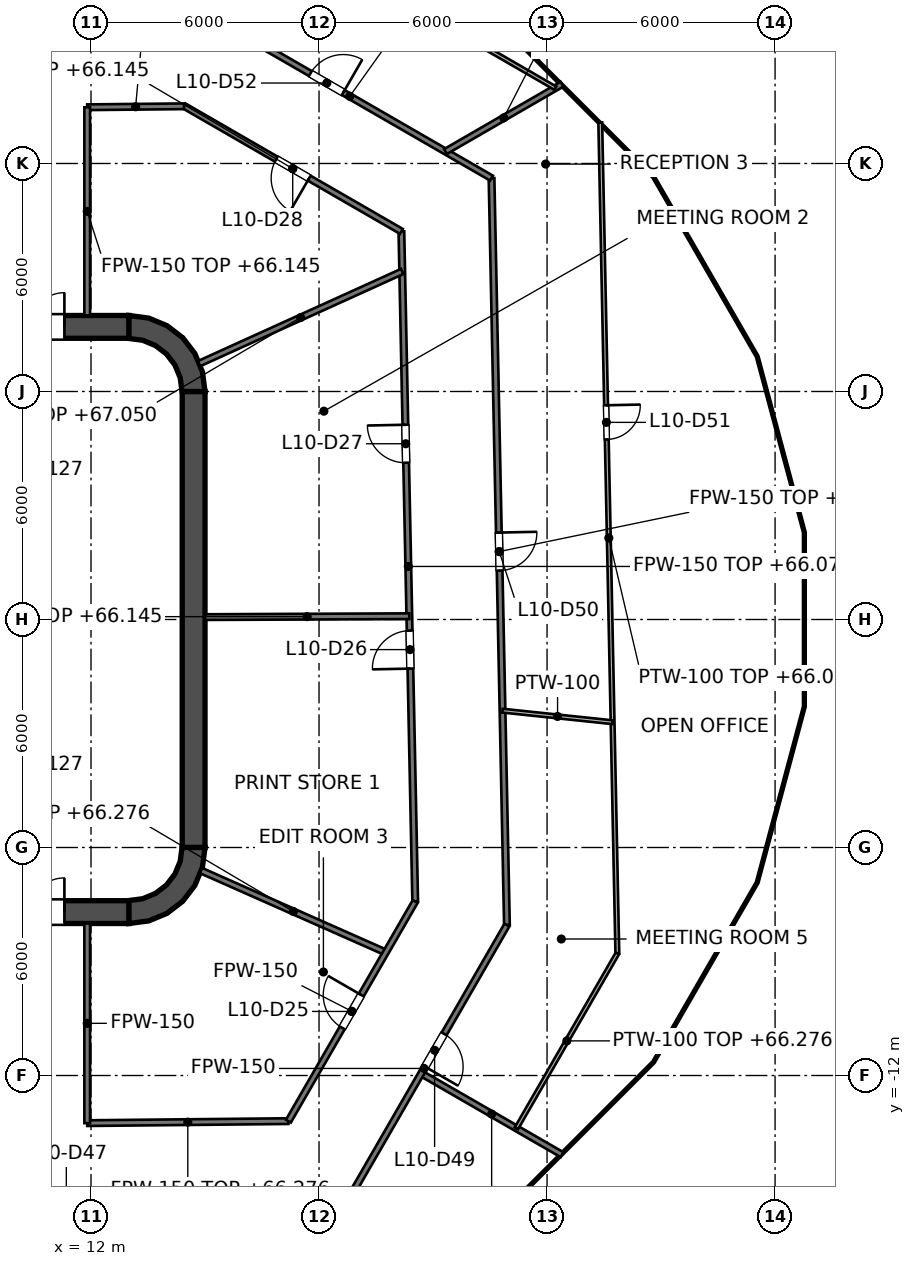
"""IFC4 building model, lengths in metres.
Left out: names, types, materials, properties, quantities, classifications, styles, units other than length and angle.
Written with IfcOpenShell. Run it as: python <this file> out.ifc"""

import sys

from ifc_helpers import new_model, si_unit, direction, frame, frame_2d, origin, place, context, subcontext, project, spatial, polyline, rectangle, outline, extrude, element, fill, save


model = new_model("IFC4")
c1 = context("Model", 3, precision=1e-05, world=origin(), true_north=direction((0.0, 1.0)))
c2 = subcontext(c1, "Body", "Model", "MODEL_VIEW")
j1 = project(units=[si_unit("LENGTHUNIT", "METRE"), si_unit("PLANEANGLEUNIT", "RADIAN")], contexts=[c1])
p1 = place(None, origin())
s1 = spatial("IfcSite", under=j1, at=p1, CompositionType="ELEMENT")
p2 = place(p1, origin())
s2 = spatial("IfcBuilding", under=s1, at=p2, CompositionType="ELEMENT")
p3 = place(p2, frame((0.0, 0.0, 63.0)))
s3 = spatial("IfcBuildingStorey", under=s2, at=p3, CompositionType="ELEMENT", Elevation=63.0)
p4 = place(p3, frame((-13.0, 7.7, 0.0), z_axis=(0.0, 0.0, 1.0), x_axis=(1.0, 0.0, 0.0)))
e1 = element("IfcWall", 1, at=p4, inside=s3, PredefinedType="SHEAR", context=c2, shape_type="SweptSolid", body=[
    extrude(rectangle(XDim=26.0, YDim=0.6, at=frame_2d((13.0, 0.0))), origin(), (0.0, 0.0, 1.0), 4.2),
])
p5 = place(p4, frame((1.7, 0.0, 0.0)))
e2 = element("IfcOpeningElement", 2, at=p5, cuts=e1, PredefinedType="OPENING", context=c2, shape_type="SweptSolid", body=[
    extrude(rectangle(XDim=1.8, YDim=2.1, at=frame_2d((0.9, 1.05))), frame((0.0, 0.3, 0.0), z_axis=(0.0, -1.0, 0.0), x_axis=(1.0, 0.0, 0.0)), (0.0, 0.0, 1.0), 0.6),
])
p6 = place(p4, frame((22.5, 0.0, 0.0)))
e3 = element("IfcOpeningElement", 3, at=p6, cuts=e1, PredefinedType="OPENING", context=c2, shape_type="SweptSolid", body=[
    extrude(rectangle(XDim=1.8, YDim=2.1, at=frame_2d((0.9, 1.05))), frame((0.0, 0.3, 0.0), z_axis=(0.0, -1.0, 0.0), x_axis=(1.0, 0.0, 0.0)), (0.0, 0.0, 1.0), 0.6),
])
p7 = place(p3, frame((-13.0, -7.7, 0.0), z_axis=(0.0, 0.0, 1.0), x_axis=(1.0, 0.0, 0.0)))
e4 = element("IfcWall", 4, at=p7, inside=s3, PredefinedType="SHEAR", context=c2, shape_type="SweptSolid", body=[
    extrude(rectangle(XDim=26.0, YDim=0.6, at=frame_2d((13.0, 0.0))), origin(), (0.0, 0.0, 1.0), 4.2),
])
p8 = place(p7, frame((1.7, 0.0, 0.0)))
e5 = element("IfcOpeningElement", 5, at=p8, cuts=e4, PredefinedType="OPENING", context=c2, shape_type="SweptSolid", body=[
    extrude(rectangle(XDim=1.8, YDim=2.1, at=frame_2d((0.9, 1.05))), frame((0.0, 0.3, 0.0), z_axis=(0.0, -1.0, 0.0), x_axis=(1.0, 0.0, 0.0)), (0.0, 0.0, 1.0), 0.6),
])
p9 = place(p7, frame((22.5, 0.0, 0.0)))
e6 = element("IfcOpeningElement", 6, at=p9, cuts=e4, PredefinedType="OPENING", context=c2, shape_type="SweptSolid", body=[
    extrude(rectangle(XDim=1.8, YDim=2.1, at=frame_2d((0.9, 1.05))), frame((0.0, 0.3, 0.0), z_axis=(0.0, -1.0, 0.0), x_axis=(1.0, 0.0, 0.0)), (0.0, 0.0, 1.0), 0.6),
])
p10 = place(p3, frame((14.7, -6.0, 0.0), z_axis=(0.0, 0.0, 1.0), x_axis=(0.0, 1.0, 0.0)))
e7 = element("IfcWall", 7, at=p10, inside=s3, PredefinedType="SHEAR", context=c2, shape_type="SweptSolid", body=[
    extrude(rectangle(XDim=12.0, YDim=0.6, at=frame_2d((6.0, 0.0))), origin(), (0.0, 0.0, 1.0), 4.2),
])
p11 = place(p3, origin())
e8 = element("IfcWall", 8, at=p11, inside=s3, PredefinedType="SHEAR", context=c2, shape_type="SweptSolid", body=[
    extrude(outline(polyline([(13.0, 8.0), (13.0, 7.395), (13.361, 7.347), (13.698, 7.208), (13.986, 6.986), (14.208, 6.698), (14.347, 6.361), (14.395, 6.0), (15.0, 6.0), (14.932, 6.518), (14.732, 7.0), (14.414, 7.414), (14.0, 7.732), (13.518, 7.932), (13.0, 8.0)])), origin(), (0.0, 0.0, 1.0), 4.2),
])
e9 = element("IfcWall", 9, at=p11, inside=s3, PredefinedType="SHEAR", context=c2, shape_type="SweptSolid", body=[
    extrude(outline(polyline([(15.0, -6.0), (14.395, -6.0), (14.347, -6.361), (14.208, -6.698), (13.986, -6.986), (13.698, -7.208), (13.361, -7.347), (13.0, -7.395), (13.0, -8.0), (13.518, -7.932), (14.0, -7.732), (14.414, -7.414), (14.732, -7.0), (14.932, -6.518), (15.0, -6.0)])), origin(), (0.0, 0.0, 1.0), 4.2),
])
p12 = place(p3, frame((11.8, -7.4, 0.0), z_axis=(0.0, 0.0, 1.0), x_axis=(0.0, 1.0, 0.0)))
e10 = element("IfcWall", 10, at=p12, inside=s3, PredefinedType="SOLIDWALL", context=c2, shape_type="SweptSolid", body=[
    extrude(rectangle(XDim=14.8, YDim=0.4, at=frame_2d((7.4, 0.0))), origin(), (0.0, 0.0, 1.0), 4.05),
])
p13 = place(p12, frame((11.2, 0.0, 0.0)))
e11 = element("IfcOpeningElement", 11, at=p13, cuts=e10, PredefinedType="OPENING", context=c2, shape_type="SweptSolid", body=[
    extrude(rectangle(XDim=1.1, YDim=2.1, at=frame_2d((0.55, 1.05))), frame((0.0, 0.2, 0.0), z_axis=(0.0, -1.0, 0.0), x_axis=(1.0, 0.0, 0.0)), (0.0, 0.0, 1.0), 0.4),
])
p14 = place(p12, frame((8.3, 0.0, 0.0)))
e12 = element("IfcOpeningElement", 12, at=p14, cuts=e10, PredefinedType="OPENING", context=c2, shape_type="SweptSolid", body=[
    extrude(rectangle(XDim=1.1, YDim=2.1, at=frame_2d((0.55, 1.05))), frame((0.0, 0.2, 0.0), z_axis=(0.0, -1.0, 0.0), x_axis=(1.0, 0.0, 0.0)), (0.0, 0.0, 1.0), 0.4),
])
p15 = place(p12, frame((5.4, 0.0, 0.0)))
e13 = element("IfcOpeningElement", 13, at=p15, cuts=e10, PredefinedType="OPENING", context=c2, shape_type="SweptSolid", body=[
    extrude(rectangle(XDim=1.1, YDim=2.1, at=frame_2d((0.55, 1.05))), frame((0.0, 0.2, 0.0), z_axis=(0.0, -1.0, 0.0), x_axis=(1.0, 0.0, 0.0)), (0.0, 0.0, 1.0), 0.4),
])
p16 = place(p12, frame((13.552, 0.0, 0.0)))
e14 = element("IfcOpeningElement", 14, at=p16, cuts=e10, PredefinedType="OPENING", context=c2, shape_type="SweptSolid", body=[
    extrude(rectangle(XDim=0.9, YDim=2.1, at=frame_2d((0.45, 1.05))), frame((0.0, 0.2, 0.0), z_axis=(0.0, -1.0, 0.0), x_axis=(1.0, 0.0, 0.0)), (0.0, 0.0, 1.0), 0.4),
])
p17 = place(p12, frame((0.347, 0.0, 0.0)))
e15 = element("IfcOpeningElement", 15, at=p17, cuts=e10, PredefinedType="OPENING", context=c2, shape_type="SweptSolid", body=[
    extrude(rectangle(XDim=0.9, YDim=2.1, at=frame_2d((0.45, 1.05))), frame((0.0, 0.2, 0.0), z_axis=(0.0, -1.0, 0.0), x_axis=(1.0, 0.0, 0.0)), (0.0, 0.0, 1.0), 0.4),
])
e16 = element("IfcWall", 16, at=p11, inside=s3, PredefinedType="SOLIDWALL", context=c2, shape_type="SweptSolid", body=[
    extrude(outline(polyline([(12.0, -5.675), (12.0, -5.925), (14.15, -5.925), (14.4, -5.925), (14.4, -5.675), (14.4, -3.025), (14.4, -2.775), (14.4, -0.125), (14.4, 0.125), (14.4, 2.775), (14.4, 3.025), (14.4, 5.675), (14.4, 5.925), (14.15, 5.925), (12.0, 5.925), (12.0, 5.675), (14.15, 5.675), (14.15, 3.025), (12.0, 3.025), (12.0, 2.775), (14.15, 2.775), (14.15, 0.125), (12.0, 0.125), (12.0, -0.125), (14.15, -0.125), (14.15, -2.775), (12.0, -2.775), (12.0, -3.025), (14.15, -3.025), (14.15, -5.675), (12.0, -5.675)])), origin(), (0.0, 0.0, 1.0), 4.05),
])
p18 = place(p3, frame((20.167, 10.213, 0.0), z_axis=(0.0, 0.0, 1.0), x_axis=(0.020624730832, -0.999787287616, 0.0)))
e17 = element("IfcWall", 17, at=p18, inside=s3, PredefinedType="PARTITIONING", context=c2, shape_type="SweptSolid", body=[
    extrude(rectangle(XDim=17.637, YDim=0.15, at=frame_2d((8.819, 0.0))), origin(), (0.0, 0.0, 1.0), 3.077),
])
p19 = place(p18, frame((10.508, 0.0, 0.0)))
e18 = element("IfcOpeningElement", 18, at=p19, cuts=e17, PredefinedType="OPENING", context=c2, shape_type="SweptSolid", body=[
    extrude(rectangle(XDim=1.0, YDim=2.1, at=frame_2d((0.5, 1.05))), frame((0.0, 0.075, 0.0), z_axis=(0.0, -1.0, 0.0), x_axis=(1.0, 0.0, 0.0)), (0.0, 0.0, 1.0), 0.15),
])
p20 = place(p18, frame((5.089, 0.0, 0.0)))
e19 = element("IfcOpeningElement", 19, at=p20, cuts=e17, PredefinedType="OPENING", context=c2, shape_type="SweptSolid", body=[
    extrude(rectangle(XDim=1.0, YDim=2.1, at=frame_2d((0.5, 1.05))), frame((0.0, 0.075, 0.0), z_axis=(0.0, -1.0, 0.0), x_axis=(1.0, 0.0, 0.0)), (0.0, 0.0, 1.0), 0.15),
])
p21 = place(p3, frame((22.539, 11.615, 0.0), z_axis=(0.0, 0.0, 1.0), x_axis=(0.020626332176, -0.99978725458, 0.0)))
e20 = element("IfcWall", 20, at=p21, inside=s3, PredefinedType="PARTITIONING", context=c2, shape_type="SweptSolid", body=[
    extrude(rectangle(XDim=19.66, YDim=0.15, at=frame_2d((9.83, 0.0))), origin(), (0.0, 0.0, 1.0), 3.077),
])
p22 = place(p21, frame((9.33, 0.0, 0.0)))
e21 = element("IfcOpeningElement", 21, at=p22, cuts=e20, PredefinedType="OPENING", context=c2, shape_type="SweptSolid", body=[
    extrude(rectangle(XDim=1.0, YDim=2.1, at=frame_2d((0.5, 1.05))), frame((0.0, 0.075, 0.0), z_axis=(0.0, -1.0, 0.0), x_axis=(1.0, 0.0, 0.0)), (0.0, 0.0, 1.0), 0.15),
])
p23 = place(p3, frame((20.69, -11.945, 0.0), z_axis=(0.0, 0.0, 1.0), x_axis=(0.866028755976, -0.499994193788, 0.0)))
e22 = element("IfcWall", 22, at=p23, inside=s3, PredefinedType="PARTITIONING", context=c2, shape_type="SweptSolid", body=[
    extrude(rectangle(XDim=4.277, YDim=0.15, at=frame_2d((2.139, 0.0))), origin(), (0.0, 0.0, 1.0), 3.352),
])
p24 = place(p3, frame((14.448, 13.515, 0.0), z_axis=(0.0, 0.0, 1.0), x_axis=(0.866016279763, -0.500015802937, 0.0)))
e23 = element("IfcWall", 23, at=p24, inside=s3, PredefinedType="PARTITIONING", context=c2, shape_type="SweptSolid", body=[
    extrude(rectangle(XDim=6.604, YDim=0.15, at=frame_2d((3.302, 0.0))), origin(), (0.0, 0.0, 1.0), 3.145),
])
p25 = place(p24, frame((2.802, 0.0, 0.0)))
e24 = element("IfcOpeningElement", 24, at=p25, cuts=e23, PredefinedType="OPENING", context=c2, shape_type="SweptSolid", body=[
    extrude(rectangle(XDim=1.0, YDim=2.1, at=frame_2d((0.5, 1.05))), frame((0.0, 0.075, 0.0), z_axis=(0.0, -1.0, 0.0), x_axis=(1.0, 0.0, 0.0)), (0.0, 0.0, 1.0), 0.15),
])
p26 = place(p3, frame((15.08, 15.921, 0.0), z_axis=(0.0, 0.0, 1.0), x_axis=(0.866020838546, -0.500007907142, 0.0)))
e25 = element("IfcWall", 25, at=p26, inside=s3, PredefinedType="PARTITIONING", context=c2, shape_type="SweptSolid", body=[
    extrude(rectangle(XDim=8.613, YDim=0.15, at=frame_2d((4.306, 0.0))), origin(), (0.0, 0.0, 1.0), 3.145),
])
p27 = place(p26, frame((3.108, 0.0, 0.0)))
e26 = element("IfcOpeningElement", 26, at=p27, cuts=e25, PredefinedType="OPENING", context=c2, shape_type="SweptSolid", body=[
    extrude(rectangle(XDim=1.0, YDim=2.1, at=frame_2d((0.5, 1.05))), frame((0.0, 0.075, 0.0), z_axis=(0.0, -1.0, 0.0), x_axis=(1.0, 0.0, 0.0)), (0.0, 0.0, 1.0), 0.15),
])
p28 = place(p3, frame((14.895, -6.607, 0.0), z_axis=(0.0, 0.0, 1.0), x_axis=(0.914233271379, -0.405188259337, 0.0)))
e27 = element("IfcWall", 27, at=p28, inside=s3, PredefinedType="PARTITIONING", context=c2, shape_type="SweptSolid", body=[
    extrude(rectangle(XDim=5.317, YDim=0.15, at=frame_2d((2.659, 0.0))), origin(), (0.0, 0.0, 1.0), 3.276),
])
p29 = place(p3, frame((15.0, 0.063, 0.0), z_axis=(0.0, 0.0, 1.0), x_axis=(0.999990294223, 0.004405843865, 0.0)))
e28 = element("IfcWall", 28, at=p29, inside=s3, PredefinedType="PARTITIONING", context=c2, shape_type="SweptSolid", body=[
    extrude(rectangle(XDim=5.375, YDim=0.15, at=frame_2d((2.688, 0.0))), origin(), (0.0, 0.0, 1.0), 3.145),
])
p30 = place(p3, frame((11.9, -13.253, 0.0), z_axis=(0.0, 0.0, 1.0), x_axis=(0.999950853109, 0.009914200296, 0.0)))
e29 = element("IfcWall", 29, at=p30, inside=s3, PredefinedType="PARTITIONING", context=c2, shape_type="SweptSolid", body=[
    extrude(rectangle(XDim=5.294, YDim=0.15, at=frame_2d((2.647, 0.0))), origin(), (0.0, 0.0, 1.0), 3.276),
])
p31 = place(p3, frame((11.9, 13.48, 0.0), z_axis=(0.0, 0.0, 1.0), x_axis=(0.999950357576, 0.009964054536, 0.0)))
e30 = element("IfcWall", 30, at=p31, inside=s3, PredefinedType="PARTITIONING", context=c2, shape_type="SweptSolid", body=[
    extrude(rectangle(XDim=2.548, YDim=0.15, at=frame_2d((1.274, 0.0))), origin(), (0.0, 0.0, 1.0), 3.276),
])
p32 = place(p3, frame((14.843, 6.733, 0.0), z_axis=(0.0, 0.0, 1.0), x_axis=(0.910628361306, 0.413226315214, 0.0)))
e31 = element("IfcWall", 31, at=p32, inside=s3, PredefinedType="PARTITIONING", context=c2, shape_type="SweptSolid", body=[
    extrude(rectangle(XDim=5.87, YDim=0.15, at=frame_2d((2.935, 0.0))), origin(), (0.0, 0.0, 1.0), 4.05),
])
p33 = place(p3, frame((21.328, 12.314, 0.0), z_axis=(0.0, 0.0, 1.0), x_axis=(0.865651247195, 0.500647498975, 0.0)))
e32 = element("IfcWall", 32, at=p33, inside=s3, PredefinedType="PARTITIONING", context=c2, shape_type="SweptSolid", body=[
    extrude(rectangle(XDim=3.54, YDim=0.15, at=frame_2d((1.77, 0.0))), origin(), (0.0, 0.0, 1.0), 3.302),
])
p34 = place(p3, frame((18.587, -15.587, 0.0), z_axis=(0.0, 0.0, 1.0), x_axis=(0.499993286632, 0.866029279715, 0.0)))
e33 = element("IfcWall", 33, at=p34, inside=s3, PredefinedType="PARTITIONING", context=c2, shape_type="SweptSolid", body=[
    extrude(rectangle(XDim=8.713, YDim=0.15, at=frame_2d((4.357, 0.0))), origin(), (0.0, 0.0, 1.0), 3.195),
])
p35 = place(p34, frame((4.408, 0.0, 0.0)))
e34 = element("IfcOpeningElement", 34, at=p35, cuts=e33, PredefinedType="OPENING", context=c2, shape_type="SweptSolid", body=[
    extrude(rectangle(XDim=1.0, YDim=2.1, at=frame_2d((0.5, 1.05))), frame((0.0, 0.075, 0.0), z_axis=(0.0, -1.0, 0.0), x_axis=(1.0, 0.0, 0.0)), (0.0, 0.0, 1.0), 0.15),
])
p36 = place(p3, frame((17.194, -13.201, 0.0), z_axis=(0.0, 0.0, 1.0), x_axis=(0.499983182885, 0.866035112932, 0.0)))
e35 = element("IfcWall", 35, at=p36, inside=s3, PredefinedType="PARTITIONING", context=c2, shape_type="SweptSolid", body=[
    extrude(rectangle(XDim=6.674, YDim=0.15, at=frame_2d((3.337, 0.0))), origin(), (0.0, 0.0, 1.0), 3.195),
])
p37 = place(p36, frame((2.834, 0.0, 0.0)))
e36 = element("IfcOpeningElement", 36, at=p37, cuts=e35, PredefinedType="OPENING", context=c2, shape_type="SweptSolid", body=[
    extrude(rectangle(XDim=1.0, YDim=2.1, at=frame_2d((0.5, 1.05))), frame((0.0, 0.075, 0.0), z_axis=(0.0, -1.0, 0.0), x_axis=(1.0, 0.0, 0.0)), (0.0, 0.0, 1.0), 0.15),
])
p38 = place(p3, frame((11.9, -13.253, 0.0), z_axis=(0.0, 0.0, 1.0), x_axis=(0.0, 1.0, 0.0)))
e37 = element("IfcWall", 37, at=p38, inside=s3, PredefinedType="PARTITIONING", context=c2, shape_type="SweptSolid", body=[
    extrude(rectangle(XDim=5.253, YDim=0.15, at=frame_2d((2.626, 0.0))), origin(), (0.0, 0.0, 1.0), 3.195),
])
p39 = place(p3, frame((11.9, 8.0, 0.0), z_axis=(0.0, 0.0, 1.0), x_axis=(0.0, 1.0, 0.0)))
e38 = element("IfcWall", 38, at=p39, inside=s3, PredefinedType="PARTITIONING", context=c2, shape_type="SweptSolid", body=[
    extrude(rectangle(XDim=5.479, YDim=0.15, at=frame_2d((2.74, 0.0))), origin(), (0.0, 0.0, 1.0), 3.145),
])
p40 = place(p3, frame((25.4, 13.079, 0.0), z_axis=(0.0, 0.0, 1.0), x_axis=(0.020572190582, -0.999788370094, 0.0)))
e39 = element("IfcWall", 39, at=p40, inside=s3, PredefinedType="PARTITIONING", context=c2, shape_type="SweptSolid", body=[
    extrude(rectangle(XDim=21.872, YDim=0.1, at=frame_2d((10.936, 0.0))), origin(), (0.0, 0.0, 1.0), 3.077),
])
p41 = place(p40, frame((7.443, 0.0, 0.0)))
e40 = element("IfcOpeningElement", 40, at=p41, cuts=e39, PredefinedType="OPENING", context=c2, shape_type="SweptSolid", body=[
    extrude(rectangle(XDim=0.9, YDim=2.1, at=frame_2d((0.45, 1.05))), frame((0.0, 0.05, 0.0), z_axis=(0.0, -1.0, 0.0), x_axis=(1.0, 0.0, 0.0)), (0.0, 0.0, 1.0), 0.1),
])
p42 = place(p3, frame((15.841, 18.819, 0.0), z_axis=(0.0, 0.0, 1.0), x_axis=(0.865993079611, -0.500055982931, 0.0)))
e41 = element("IfcWall", 41, at=p42, inside=s3, PredefinedType="PARTITIONING", context=c2, shape_type="SweptSolid", body=[
    extrude(rectangle(XDim=9.673, YDim=0.1, at=frame_2d((4.837, 0.0))), origin(), (0.0, 0.0, 1.0), 3.145),
])
p43 = place(p3, frame((22.828, -2.399, 0.0), z_axis=(0.0, 0.0, 1.0), x_axis=(0.994541671448, -0.104340134908, 0.0)))
e42 = element("IfcWall", 42, at=p43, inside=s3, PredefinedType="PARTITIONING", context=c2, shape_type="SweptSolid", body=[
    extrude(rectangle(XDim=2.913, YDim=0.1, at=frame_2d((1.457, 0.0))), origin(), (0.0, 0.0, 1.0), 4.05),
])
p44 = place(p3, frame((23.193, -13.39, 0.0), z_axis=(0.0, 0.0, 1.0), x_axis=(0.500018082969, 0.866014963326, 0.0)))
e43 = element("IfcWall", 43, at=p44, inside=s3, PredefinedType="PARTITIONING", context=c2, shape_type="SweptSolid", body=[
    extrude(rectangle(XDim=5.314, YDim=0.1, at=frame_2d((2.657, 0.0))), origin(), (0.0, 0.0, 1.0), 3.276),
])
p45 = place(p13, origin())
e44 = element("IfcDoor", 44, at=p45, inside=s3, OperationType="DOUBLE_DOOR_SLIDING", PredefinedType="DOOR", context=c2, shape_type="SweptSolid", body=[
    extrude(rectangle(XDim=1.1, YDim=2.1, at=frame_2d((0.55, 1.05))), frame((0.0, 0.025, 0.0), z_axis=(0.0, -1.0, 0.0), x_axis=(1.0, 0.0, 0.0)), (0.0, 0.0, 1.0), 0.05),
])
fill(e11, e44)
p46 = place(p14, origin())
e45 = element("IfcDoor", 45, at=p46, inside=s3, OperationType="DOUBLE_DOOR_SLIDING", PredefinedType="DOOR", context=c2, shape_type="SweptSolid", body=[
    extrude(rectangle(XDim=1.1, YDim=2.1, at=frame_2d((0.55, 1.05))), frame((0.0, 0.025, 0.0), z_axis=(0.0, -1.0, 0.0), x_axis=(1.0, 0.0, 0.0)), (0.0, 0.0, 1.0), 0.05),
])
fill(e12, e45)
p47 = place(p15, origin())
e46 = element("IfcDoor", 46, at=p47, inside=s3, OperationType="DOUBLE_DOOR_SLIDING", PredefinedType="DOOR", context=c2, shape_type="SweptSolid", body=[
    extrude(rectangle(XDim=1.1, YDim=2.1, at=frame_2d((0.55, 1.05))), frame((0.0, 0.025, 0.0), z_axis=(0.0, -1.0, 0.0), x_axis=(1.0, 0.0, 0.0)), (0.0, 0.0, 1.0), 0.05),
])
fill(e13, e46)
p48 = place(p16, origin())
e47 = element("IfcDoor", 47, at=p48, inside=s3, OperationType="SINGLE_SWING_RIGHT", PredefinedType="DOOR", context=c2, shape_type="SweptSolid", body=[
    extrude(rectangle(XDim=0.9, YDim=2.1, at=frame_2d((0.45, 1.05))), frame((0.0, 0.025, 0.0), z_axis=(0.0, -1.0, 0.0), x_axis=(1.0, 0.0, 0.0)), (0.0, 0.0, 1.0), 0.05),
])
fill(e14, e47)
p49 = place(p17, origin())
e48 = element("IfcDoor", 48, at=p49, inside=s3, OperationType="SINGLE_SWING_RIGHT", PredefinedType="DOOR", context=c2, shape_type="SweptSolid", body=[
    extrude(rectangle(XDim=0.9, YDim=2.1, at=frame_2d((0.45, 1.05))), frame((0.0, 0.025, 0.0), z_axis=(0.0, -1.0, 0.0), x_axis=(1.0, 0.0, 0.0)), (0.0, 0.0, 1.0), 0.05),
])
fill(e15, e48)
p50 = place(p6, origin())
e49 = element("IfcDoor", 49, at=p50, inside=s3, OperationType="DOUBLE_DOOR_SINGLE_SWING", PredefinedType="DOOR", context=c2, shape_type="SweptSolid", body=[
    extrude(rectangle(XDim=1.8, YDim=2.1, at=frame_2d((0.9, 1.05))), frame((0.0, 0.025, 0.0), z_axis=(0.0, -1.0, 0.0), x_axis=(1.0, 0.0, 0.0)), (0.0, 0.0, 1.0), 0.05),
])
fill(e3, e49)
p51 = place(p9, origin())
e50 = element("IfcDoor", 50, at=p51, inside=s3, OperationType="DOUBLE_DOOR_SINGLE_SWING", PredefinedType="DOOR", context=c2, shape_type="SweptSolid", body=[
    extrude(rectangle(XDim=1.8, YDim=2.1, at=frame_2d((0.9, 1.05))), frame((0.0, 0.025, 0.0), z_axis=(0.0, -1.0, 0.0), x_axis=(1.0, 0.0, 0.0)), (0.0, 0.0, 1.0), 0.05),
])
fill(e6, e50)
p52 = place(p37, origin())
e51 = element("IfcDoor", 51, at=p52, inside=s3, OperationType="SINGLE_SWING_RIGHT", PredefinedType="DOOR", context=c2, shape_type="SweptSolid", body=[
    extrude(rectangle(XDim=1.0, YDim=2.1, at=frame_2d((0.5, 1.05))), frame((0.0, 0.025, 0.0), z_axis=(0.0, -1.0, 0.0), x_axis=(1.0, 0.0, 0.0)), (0.0, 0.0, 1.0), 0.05),
])
fill(e36, e51)
p53 = place(p19, origin())
e52 = element("IfcDoor", 52, at=p53, inside=s3, OperationType="SINGLE_SWING_RIGHT", PredefinedType="DOOR", context=c2, shape_type="SweptSolid", body=[
    extrude(rectangle(XDim=1.0, YDim=2.1, at=frame_2d((0.5, 1.05))), frame((0.0, 0.025, 0.0), z_axis=(0.0, -1.0, 0.0), x_axis=(1.0, 0.0, 0.0)), (0.0, 0.0, 1.0), 0.05),
])
fill(e18, e52)
p54 = place(p20, origin())
e53 = element("IfcDoor", 53, at=p54, inside=s3, OperationType="SINGLE_SWING_LEFT", PredefinedType="DOOR", context=c2, shape_type="SweptSolid", body=[
    extrude(rectangle(XDim=1.0, YDim=2.1, at=frame_2d((0.5, 1.05))), frame((0.0, 0.025, 0.0), z_axis=(0.0, -1.0, 0.0), x_axis=(1.0, 0.0, 0.0)), (0.0, 0.0, 1.0), 0.05),
])
fill(e19, e53)
p55 = place(p25, origin())
e54 = element("IfcDoor", 54, at=p55, inside=s3, OperationType="SINGLE_SWING_RIGHT", PredefinedType="DOOR", context=c2, shape_type="SweptSolid", body=[
    extrude(rectangle(XDim=1.0, YDim=2.1, at=frame_2d((0.5, 1.05))), frame((0.0, 0.025, 0.0), z_axis=(0.0, -1.0, 0.0), x_axis=(1.0, 0.0, 0.0)), (0.0, 0.0, 1.0), 0.05),
])
fill(e24, e54)
p56 = place(p35, origin())
e55 = element("IfcDoor", 55, at=p56, inside=s3, OperationType="SINGLE_SWING_LEFT", PredefinedType="DOOR", context=c2, shape_type="SweptSolid", body=[
    extrude(rectangle(XDim=1.0, YDim=2.1, at=frame_2d((0.5, 1.05))), frame((0.0, 0.025, 0.0), z_axis=(0.0, -1.0, 0.0), x_axis=(1.0, 0.0, 0.0)), (0.0, 0.0, 1.0), 0.05),
])
fill(e34, e55)
p57 = place(p22, origin())
e56 = element("IfcDoor", 56, at=p57, inside=s3, OperationType="SINGLE_SWING_LEFT", PredefinedType="DOOR", context=c2, shape_type="SweptSolid", body=[
    extrude(rectangle(XDim=1.0, YDim=2.1, at=frame_2d((0.5, 1.05))), frame((0.0, 0.025, 0.0), z_axis=(0.0, -1.0, 0.0), x_axis=(1.0, 0.0, 0.0)), (0.0, 0.0, 1.0), 0.05),
])
fill(e21, e56)
p58 = place(p41, origin())
e57 = element("IfcDoor", 57, at=p58, inside=s3, OperationType="SINGLE_SWING_LEFT", PredefinedType="DOOR", context=c2, shape_type="SweptSolid", body=[
    extrude(rectangle(XDim=0.9, YDim=2.1, at=frame_2d((0.45, 1.05))), frame((0.0, 0.025, 0.0), z_axis=(0.0, -1.0, 0.0), x_axis=(1.0, 0.0, 0.0)), (0.0, 0.0, 1.0), 0.05),
])
fill(e40, e57)
p59 = place(p27, origin())
e58 = element("IfcDoor", 58, at=p59, inside=s3, OperationType="SINGLE_SWING_RIGHT", PredefinedType="DOOR", context=c2, shape_type="SweptSolid", body=[
    extrude(rectangle(XDim=1.0, YDim=2.1, at=frame_2d((0.5, 1.05))), frame((0.0, 0.025, 0.0), z_axis=(0.0, -1.0, 0.0), x_axis=(1.0, 0.0, 0.0)), (0.0, 0.0, 1.0), 0.05),
])
fill(e26, e58)
save(model, sys.argv[1])
